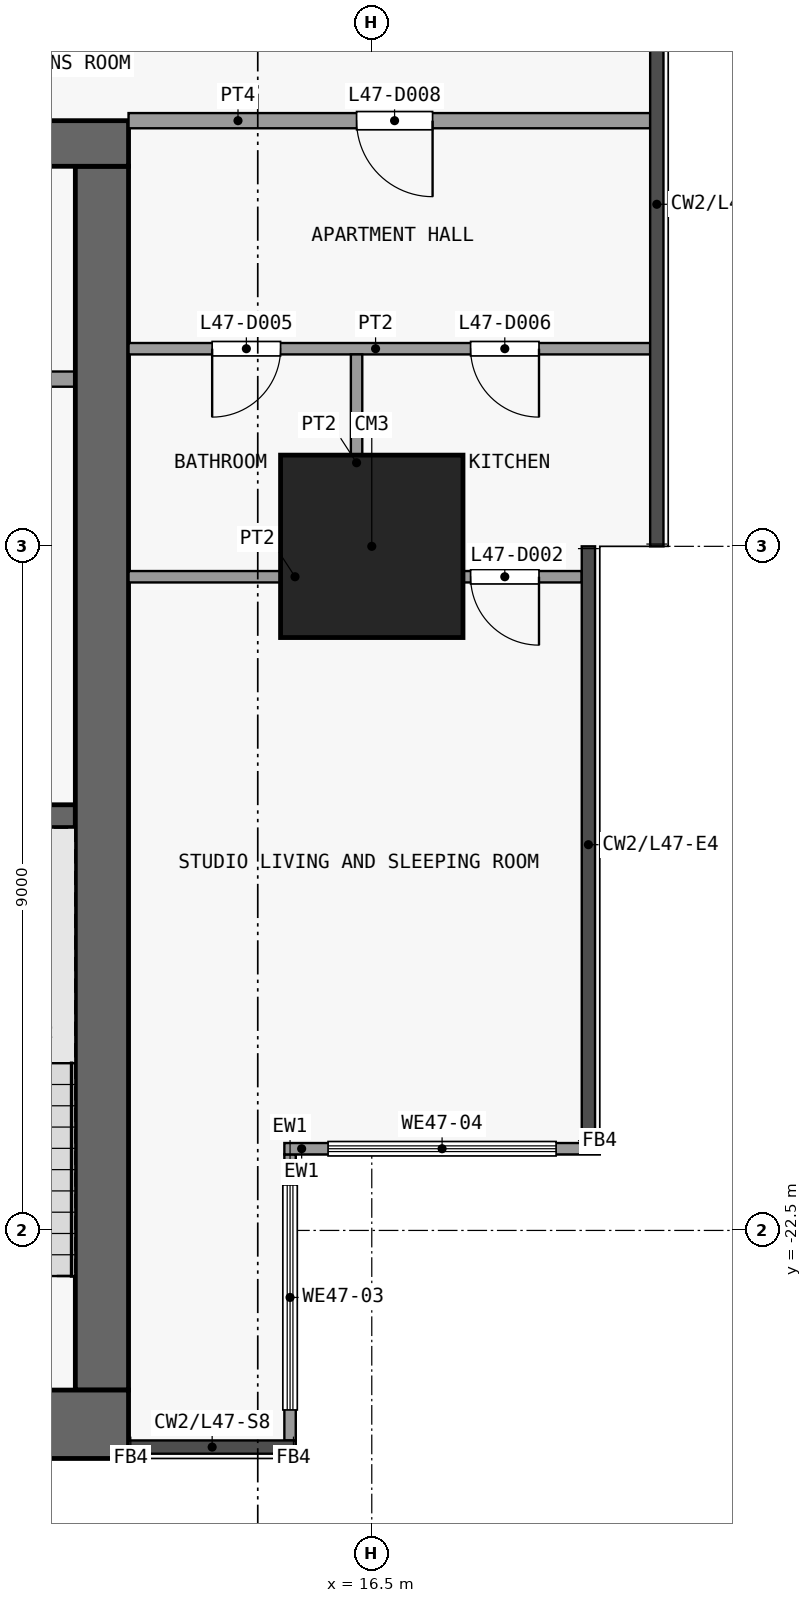
"""IFC4 building model, lengths in metres.
Left out: names, types, materials, properties, quantities, classifications, styles, units other than length and angle.
Written with IfcOpenShell. Run it as: python <this file> out.ifc"""

import sys

from ifc_helpers import new_model, si_unit, direction, frame, frame_2d, origin, origin_2d, place, context, subcontext, project, spatial, rectangle, extrude, element, fill, save


model = new_model("IFC4")
c1 = context("Model", 3, precision=1e-05, world=origin(), true_north=direction((0.0, 1.0)))
c2 = subcontext(c1, "Body", "Model", "MODEL_VIEW")
j1 = project(units=[si_unit("LENGTHUNIT", "METRE"), si_unit("PLANEANGLEUNIT", "RADIAN")], contexts=[c1])
p1 = place(None, origin())
s1 = spatial("IfcSite", under=j1, at=p1, CompositionType="ELEMENT")
p2 = place(p1, origin())
s2 = spatial("IfcBuilding", under=s1, at=p2, CompositionType="ELEMENT")
p3 = place(p2, frame((0.0, 0.0, 188.9)))
s3 = spatial("IfcBuildingStorey", under=s2, at=p3, CompositionType="ELEMENT", Elevation=188.9)
p4 = place(p3, frame((16.5, -13.5, 0.0), z_axis=(0.0, 0.0, 1.0), x_axis=(1.0, 0.0, 0.0)))
e1 = element("IfcColumn", 1, at=p4, inside=s3, PredefinedType="COLUMN", context=c2, shape_type="SweptSolid", body=[
    extrude(rectangle(XDim=2.4, YDim=2.4, at=origin_2d()), origin(), (0.0, 0.0, 1.0), 3.6),
])
p5 = place(p3, frame((-13.3, -25.05, 0.0), z_axis=(0.0, 0.0, 1.0), x_axis=(1.0, 0.0, 0.0)))
e2 = element("IfcWall", 2, at=p5, inside=s3, PredefinedType="SHEAR", context=c2, shape_type="SweptSolid", body=[
    extrude(rectangle(XDim=26.6, YDim=0.9, at=frame_2d((13.3, 0.0))), origin(), (0.0, 0.0, 1.0), 3.3),
])
p6 = place(p3, frame((-13.3, -8.2, 0.0), z_axis=(0.0, 0.0, 1.0), x_axis=(1.0, 0.0, 0.0)))
e3 = element("IfcWall", 3, at=p6, inside=s3, PredefinedType="SHEAR", context=c2, shape_type="SweptSolid", body=[
    extrude(rectangle(XDim=26.6, YDim=0.6, at=frame_2d((13.3, 0.0))), origin(), (0.0, 0.0, 1.0), 3.3),
])
p7 = place(p6, frame((7.6, 0.0, 0.0)))
e4 = element("IfcOpeningElement", 4, at=p7, cuts=e3, PredefinedType="OPENING", context=c2, shape_type="SweptSolid", body=[
    extrude(rectangle(XDim=1.8, YDim=2.1, at=frame_2d((0.9, 1.05))), frame((0.0, 0.31, 0.0), z_axis=(0.0, -1.0, 0.0), x_axis=(1.0, 0.0, 0.0)), (0.0, 0.0, 1.0), 0.62),
])
p8 = place(p6, frame((17.2, 0.0, 0.0)))
e5 = element("IfcOpeningElement", 5, at=p8, cuts=e3, PredefinedType="OPENING", context=c2, shape_type="SweptSolid", body=[
    extrude(rectangle(XDim=1.8, YDim=2.1, at=frame_2d((0.9, 1.05))), frame((0.0, 0.31, 0.0), z_axis=(0.0, -1.0, 0.0), x_axis=(1.0, 0.0, 0.0)), (0.0, 0.0, 1.0), 0.62),
])
p9 = place(p6, frame((2.525, 0.0, 0.0)))
e6 = element("IfcOpeningElement", 6, at=p9, cuts=e3, PredefinedType="OPENING", context=c2, shape_type="SweptSolid", body=[
    extrude(rectangle(XDim=0.9, YDim=2.1, at=frame_2d((0.45, 1.05))), frame((0.0, 0.31, 0.0), z_axis=(0.0, -1.0, 0.0), x_axis=(1.0, 0.0, 0.0)), (0.0, 0.0, 1.0), 0.62),
])
p10 = place(p6, frame((23.175, 0.0, 0.0)))
e7 = element("IfcOpeningElement", 7, at=p10, cuts=e3, PredefinedType="OPENING", context=c2, shape_type="SweptSolid", body=[
    extrude(rectangle(XDim=0.9, YDim=2.1, at=frame_2d((0.45, 1.05))), frame((0.0, 0.31, 0.0), z_axis=(0.0, -1.0, 0.0), x_axis=(1.0, 0.0, 0.0)), (0.0, 0.0, 1.0), 0.62),
])
p11 = place(p3, frame((12.95, -24.6, 0.0), z_axis=(0.0, 0.0, 1.0), x_axis=(0.0, 1.0, 0.0)))
e8 = element("IfcWall", 8, at=p11, inside=s3, PredefinedType="SHEAR", context=c2, shape_type="SweptSolid", body=[
    extrude(rectangle(XDim=16.1, YDim=0.7, at=frame_2d((8.05, 0.0))), origin(), (0.0, 0.0, 1.0), 3.3),
])
p12 = place(p3, frame((9.5, -17.05, 0.0), z_axis=(0.0, 0.0, 1.0), x_axis=(1.0, 0.0, 0.0)))
e9 = element("IfcWall", 9, at=p12, inside=s3, PredefinedType="SHEAR", context=c2, shape_type="SweptSolid", body=[
    extrude(rectangle(XDim=3.1, YDim=0.3, at=frame_2d((1.55, 0.0))), origin(), (0.0, 0.0, 1.0), 3.3),
])
p13 = place(p3, frame((11.15, -11.3, 0.0), z_axis=(0.0, 0.0, 1.0), x_axis=(1.0, 0.0, 0.0)))
e10 = element("IfcWall", 10, at=p13, inside=s3, PredefinedType="PARTITIONING", context=c2, shape_type="SweptSolid", body=[
    extrude(rectangle(XDim=1.45, YDim=0.2, at=frame_2d((0.725, 0.0))), origin(), (0.0, 0.0, 1.0), 3.3),
])
p14 = place(p3, frame((15.425, -21.5, 0.0), z_axis=(0.0, 0.0, 1.0), x_axis=(0.0, -1.0, 0.0)))
e11 = element("IfcWall", 11, at=p14, inside=s3, PredefinedType="SOLIDWALL", context=c2, shape_type="SweptSolid", body=[
    extrude(rectangle(XDim=3.762, YDim=0.15, at=frame_2d((1.881, 0.0))), origin(), (0.0, 0.0, 1.0), 3.3),
])
p15 = place(p14, frame((0.401, 0.0, 0.9)))
e12 = element("IfcOpeningElement", 12, at=p15, cuts=e11, PredefinedType="OPENING", context=c2, shape_type="SweptSolid", body=[
    extrude(rectangle(XDim=2.96, YDim=2.4, at=frame_2d((1.48, 1.2))), frame((0.0, 0.085, 0.0), z_axis=(0.0, -1.0, 0.0), x_axis=(1.0, 0.0, 0.0)), (0.0, 0.0, 1.0), 0.17),
])
p16 = place(p3, frame((19.5, -21.425, 0.0), z_axis=(0.0, 0.0, 1.0), x_axis=(-1.0, 0.0, 0.0)))
e13 = element("IfcWall", 13, at=p16, inside=s3, PredefinedType="SOLIDWALL", context=c2, shape_type="SweptSolid", body=[
    extrude(rectangle(XDim=4.15, YDim=0.15, at=frame_2d((2.075, 0.0))), origin(), (0.0, 0.0, 1.0), 3.3),
])
p17 = place(p16, frame((0.575, 0.0, 0.9)))
e14 = element("IfcOpeningElement", 14, at=p17, cuts=e13, PredefinedType="OPENING", context=c2, shape_type="SweptSolid", body=[
    extrude(rectangle(XDim=3.0, YDim=2.4, at=frame_2d((1.5, 1.2))), frame((0.0, 0.085, 0.0), z_axis=(0.0, -1.0, 0.0), x_axis=(1.0, 0.0, 0.0)), (0.0, 0.0, 1.0), 0.17),
])
p18 = place(p3, frame((13.3, -13.9, 0.0), z_axis=(0.0, 0.0, 1.0), x_axis=(1.0, 0.0, 0.0)))
e15 = element("IfcWall", 15, at=p18, inside=s3, PredefinedType="PARTITIONING", context=c2, shape_type="SweptSolid", body=[
    extrude(rectangle(XDim=5.962, YDim=0.15, at=frame_2d((2.981, 0.0))), origin(), (0.0, 0.0, 1.0), 3.3),
])
p19 = place(p18, frame((4.5, 0.0, 0.0)))
e16 = element("IfcOpeningElement", 16, at=p19, cuts=e15, PredefinedType="OPENING", context=c2, shape_type="SweptSolid", body=[
    extrude(rectangle(XDim=0.9, YDim=2.1, at=frame_2d((0.45, 1.05))), frame((0.0, 0.085, 0.0), z_axis=(0.0, -1.0, 0.0), x_axis=(1.0, 0.0, 0.0)), (0.0, 0.0, 1.0), 0.17),
])
p20 = place(p3, frame((13.3, -10.9, 0.0), z_axis=(0.0, 0.0, 1.0), x_axis=(1.0, 0.0, 0.0)))
e17 = element("IfcWall", 17, at=p20, inside=s3, PredefinedType="PARTITIONING", context=c2, shape_type="SweptSolid", body=[
    extrude(rectangle(XDim=6.863, YDim=0.15, at=frame_2d((3.431, 0.0))), origin(), (0.0, 0.0, 1.0), 3.3),
])
p21 = place(p20, frame((1.1, 0.0, 0.0)))
e18 = element("IfcOpeningElement", 18, at=p21, cuts=e17, PredefinedType="OPENING", context=c2, shape_type="SweptSolid", body=[
    extrude(rectangle(XDim=0.9, YDim=2.1, at=frame_2d((0.45, 1.05))), frame((0.0, 0.085, 0.0), z_axis=(0.0, -1.0, 0.0), x_axis=(1.0, 0.0, 0.0)), (0.0, 0.0, 1.0), 0.17),
])
p22 = place(p20, frame((4.5, 0.0, 0.0)))
e19 = element("IfcOpeningElement", 19, at=p22, cuts=e17, PredefinedType="OPENING", context=c2, shape_type="SweptSolid", body=[
    extrude(rectangle(XDim=0.9, YDim=2.1, at=frame_2d((0.45, 1.05))), frame((0.0, 0.085, 0.0), z_axis=(0.0, -1.0, 0.0), x_axis=(1.0, 0.0, 0.0)), (0.0, 0.0, 1.0), 0.17),
])
p23 = place(p3, frame((13.3, -7.9, 0.0), z_axis=(0.0, 0.0, 1.0), x_axis=(1.0, 0.0, 0.0)))
e20 = element("IfcWall", 20, at=p23, inside=s3, PredefinedType="PARTITIONING", context=c2, shape_type="SweptSolid", body=[
    extrude(rectangle(XDim=6.863, YDim=0.2, at=frame_2d((3.431, 0.0))), origin(), (0.0, 0.0, 1.0), 3.3),
])
p24 = place(p23, frame((3.0, 0.0, 0.0)))
e21 = element("IfcOpeningElement", 21, at=p24, cuts=e20, PredefinedType="OPENING", context=c2, shape_type="SweptSolid", body=[
    extrude(rectangle(XDim=1.0, YDim=2.1, at=frame_2d((0.5, 1.05))), frame((0.0, 0.11, 0.0), z_axis=(0.0, -1.0, 0.0), x_axis=(1.0, 0.0, 0.0)), (0.0, 0.0, 1.0), 0.22),
])
p25 = place(p3, frame((16.3, -13.825, 0.0), z_axis=(0.0, 0.0, 1.0), x_axis=(0.0, 1.0, 0.0)))
e22 = element("IfcWall", 22, at=p25, inside=s3, PredefinedType="PARTITIONING", context=c2, shape_type="SweptSolid", body=[
    extrude(rectangle(XDim=2.85, YDim=0.15, at=frame_2d((1.425, 0.0))), origin(), (0.0, 0.0, 1.0), 3.3),
])
p26 = place(p15, origin())
e23 = element("IfcWindow", 23, at=p26, inside=s3, PartitioningType="SINGLE_PANEL", PredefinedType="WINDOW", context=c2, shape_type="SweptSolid", body=[
    extrude(rectangle(XDim=2.96, YDim=2.4, at=frame_2d((1.48, 1.2))), frame((0.0, 0.03, 0.0), z_axis=(0.0, -1.0, 0.0), x_axis=(1.0, 0.0, 0.0)), (0.0, 0.0, 1.0), 0.06),
])
fill(e12, e23)
p27 = place(p17, origin())
e24 = element("IfcWindow", 24, at=p27, inside=s3, PartitioningType="SINGLE_PANEL", PredefinedType="WINDOW", context=c2, shape_type="SweptSolid", body=[
    extrude(rectangle(XDim=3.0, YDim=2.4, at=frame_2d((1.5, 1.2))), frame((0.0, 0.03, 0.0), z_axis=(0.0, -1.0, 0.0), x_axis=(1.0, 0.0, 0.0)), (0.0, 0.0, 1.0), 0.06),
])
fill(e14, e24)
p28 = place(p19, origin())
e25 = element("IfcDoor", 25, at=p28, inside=s3, OperationType="SINGLE_SWING_RIGHT", PredefinedType="DOOR", context=c2, shape_type="SweptSolid", body=[
    extrude(rectangle(XDim=0.9, YDim=2.1, at=frame_2d((0.45, 1.05))), frame((0.0, 0.025, 0.0), z_axis=(0.0, -1.0, 0.0), x_axis=(1.0, 0.0, 0.0)), (0.0, 0.0, 1.0), 0.05),
])
fill(e16, e25)
p29 = place(p21, origin())
e26 = element("IfcDoor", 26, at=p29, inside=s3, OperationType="SINGLE_SWING_LEFT", PredefinedType="DOOR", context=c2, shape_type="SweptSolid", body=[
    extrude(rectangle(XDim=0.9, YDim=2.1, at=frame_2d((0.45, 1.05))), frame((0.0, 0.025, 0.0), z_axis=(0.0, -1.0, 0.0), x_axis=(1.0, 0.0, 0.0)), (0.0, 0.0, 1.0), 0.05),
])
fill(e18, e26)
p30 = place(p22, origin())
e27 = element("IfcDoor", 27, at=p30, inside=s3, OperationType="SINGLE_SWING_RIGHT", PredefinedType="DOOR", context=c2, shape_type="SweptSolid", body=[
    extrude(rectangle(XDim=0.9, YDim=2.1, at=frame_2d((0.45, 1.05))), frame((0.0, 0.025, 0.0), z_axis=(0.0, -1.0, 0.0), x_axis=(1.0, 0.0, 0.0)), (0.0, 0.0, 1.0), 0.05),
])
fill(e19, e27)
p31 = place(p24, origin())
e28 = element("IfcDoor", 28, at=p31, inside=s3, OperationType="SINGLE_SWING_RIGHT", PredefinedType="DOOR", context=c2, shape_type="SweptSolid", body=[
    extrude(rectangle(XDim=1.0, YDim=2.1, at=frame_2d((0.5, 1.05))), frame((0.0, 0.025, 0.0), z_axis=(0.0, -1.0, 0.0), x_axis=(1.0, 0.0, 0.0)), (0.0, 0.0, 1.0), 0.05),
])
fill(e21, e28)
save(model, sys.argv[1])
